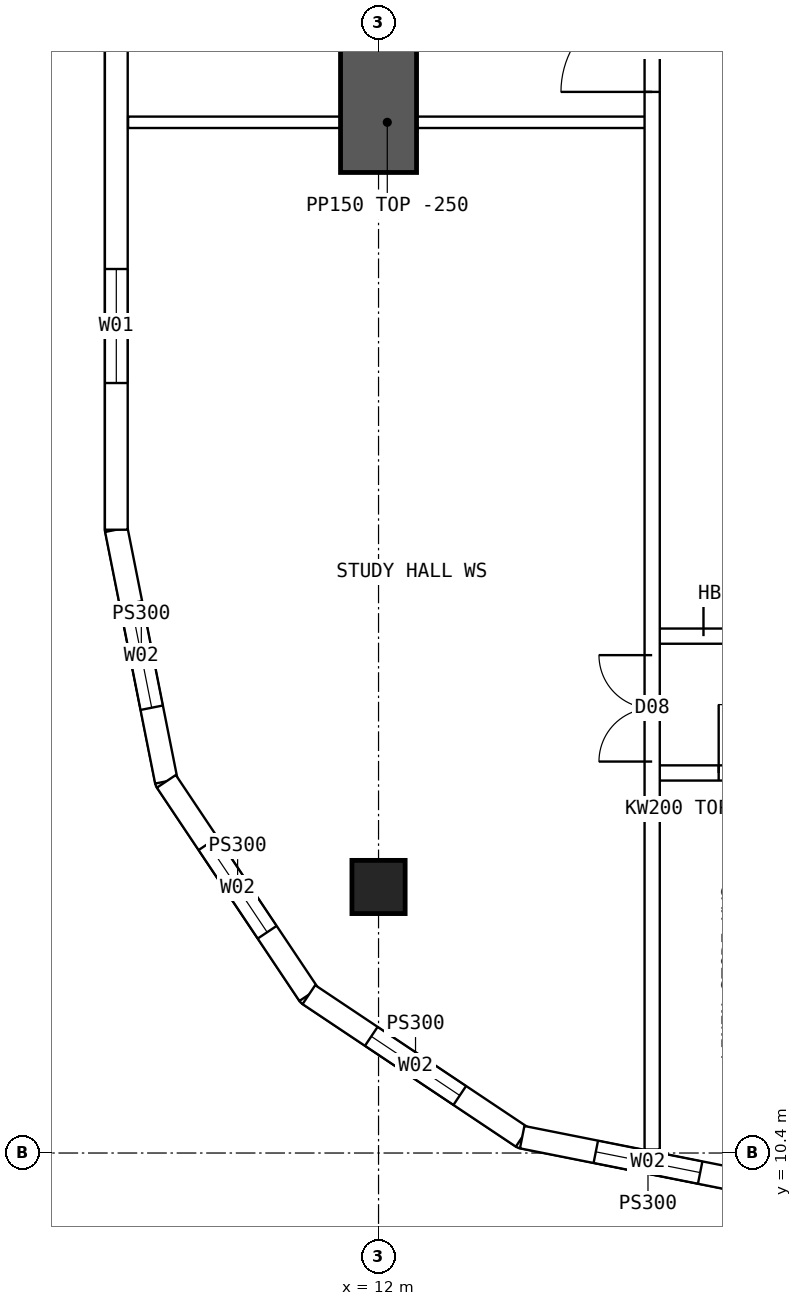
"""IFC4 building model, lengths in metres.
Left out: names, types, materials, properties, quantities, classifications, styles, units other than length and angle.
Written with IfcOpenShell. Run it as: python <this file> out.ifc"""

import sys

from ifc_helpers import new_model, si_unit, direction, frame, frame_2d, origin, origin_2d, place, context, subcontext, project, spatial, polyline, rectangle, hollow_rectangle, outline, extrude, element, fill, save


model = new_model("IFC4")
c1 = context("Model", 3, precision=1e-05, world=origin(), true_north=direction((0.0, 1.0)))
c2 = subcontext(c1, "Body", "Model", "MODEL_VIEW")
j1 = project(units=[si_unit("LENGTHUNIT", "METRE"), si_unit("PLANEANGLEUNIT", "RADIAN")], contexts=[c1])
p1 = place(None, origin())
s1 = spatial("IfcSite", under=j1, at=p1, CompositionType="ELEMENT")
p2 = place(p1, origin())
s2 = spatial("IfcBuilding", under=s1, at=p2, CompositionType="ELEMENT")
p3 = place(p2, frame((0.0, 0.0, 156.1)))
s3 = spatial("IfcBuildingStorey", under=s2, at=p3, CompositionType="ELEMENT", Elevation=156.1)
p4 = place(p3, frame((12.0, 13.9, 0.0), z_axis=(0.0, 0.0, 1.0), x_axis=(1.0, 0.0, 0.0)))
e1 = element("IfcColumn", 1, at=p4, inside=s3, PredefinedType="COLUMN", context=c2, shape_type="SweptSolid", body=[
    extrude(hollow_rectangle(XDim=0.7, YDim=0.7, WallThickness=0.07, at=origin_2d()), origin(), (0.0, 0.0, 1.0), 3.75),
])
p5 = place(p3, frame((12.0, 23.3, 0.0), z_axis=(0.0, 0.0, 1.0), x_axis=(0.0, 1.0, 0.0)))
e2 = element("IfcWall", 2, at=p5, inside=s3, PredefinedType="SHEAR", context=c2, shape_type="SweptSolid", body=[
    extrude(rectangle(XDim=5.0, YDim=1.0, at=frame_2d((2.5, 0.0))), origin(), (0.0, 0.0, 1.0), 3.75),
])
p6 = place(p3, frame((8.55, 45.4, 0.0), z_axis=(0.0, 0.0, 1.0), x_axis=(0.0, -1.0, 0.0)))
e3 = element("IfcWall", 3, at=p6, inside=s3, PredefinedType="SOLIDWALL", context=c2, shape_type="SweptSolid", body=[
    extrude(outline(polyline([(-0.015, -0.15), (26.815, -0.15), (26.785, 0.15), (0.015, 0.15), (-0.015, -0.15)])), origin(), (0.0, 0.0, 1.0), 3.5),
])
p7 = place(p6, frame((1.93, 0.0, 0.9)))
e4 = element("IfcOpeningElement", 4, at=p7, cuts=e3, PredefinedType="OPENING", context=c2, shape_type="SweptSolid", body=[
    extrude(rectangle(XDim=1.5, YDim=2.0, at=frame_2d((0.75, 1.0))), frame((0.0, 0.16, 0.0), z_axis=(0.0, -1.0, 0.0), x_axis=(1.0, 0.0, 0.0)), (0.0, 0.0, 1.0), 0.32),
])
p8 = place(p6, frame((7.29, 0.0, 0.9)))
e5 = element("IfcOpeningElement", 5, at=p8, cuts=e3, PredefinedType="OPENING", context=c2, shape_type="SweptSolid", body=[
    extrude(rectangle(XDim=1.5, YDim=2.0, at=frame_2d((0.75, 1.0))), frame((0.0, 0.16, 0.0), z_axis=(0.0, -1.0, 0.0), x_axis=(1.0, 0.0, 0.0)), (0.0, 0.0, 1.0), 0.32),
])
p9 = place(p6, frame((12.65, 0.0, 0.9)))
e6 = element("IfcOpeningElement", 6, at=p9, cuts=e3, PredefinedType="OPENING", context=c2, shape_type="SweptSolid", body=[
    extrude(rectangle(XDim=1.5, YDim=2.0, at=frame_2d((0.75, 1.0))), frame((0.0, 0.16, 0.0), z_axis=(0.0, -1.0, 0.0), x_axis=(1.0, 0.0, 0.0)), (0.0, 0.0, 1.0), 0.32),
])
p10 = place(p6, frame((18.01, 0.0, 0.9)))
e7 = element("IfcOpeningElement", 7, at=p10, cuts=e3, PredefinedType="OPENING", context=c2, shape_type="SweptSolid", body=[
    extrude(rectangle(XDim=1.5, YDim=2.0, at=frame_2d((0.75, 1.0))), frame((0.0, 0.16, 0.0), z_axis=(0.0, -1.0, 0.0), x_axis=(1.0, 0.0, 0.0)), (0.0, 0.0, 1.0), 0.32),
])
p11 = place(p6, frame((23.37, 0.0, 0.9)))
e8 = element("IfcOpeningElement", 8, at=p11, cuts=e3, PredefinedType="OPENING", context=c2, shape_type="SweptSolid", body=[
    extrude(rectangle(XDim=1.5, YDim=2.0, at=frame_2d((0.75, 1.0))), frame((0.0, 0.16, 0.0), z_axis=(0.0, -1.0, 0.0), x_axis=(1.0, 0.0, 0.0)), (0.0, 0.0, 1.0), 0.32),
])
p12 = place(p3, frame((8.55, 18.6, 0.0), z_axis=(0.0, 0.0, 1.0), x_axis=(0.19508664885, -0.980786011034, 0.0)))
e9 = element("IfcWall", 9, at=p12, inside=s3, PredefinedType="SOLIDWALL", context=c2, shape_type="SweptSolid", body=[
    extrude(outline(polyline([(-0.015, -0.15), (3.405, -0.15), (3.345, 0.15), (0.015, 0.15), (-0.015, -0.15)])), origin(), (0.0, 0.0, 1.0), 3.5),
])
p13 = place(p12, frame((0.988, 0.0, 0.9)))
e10 = element("IfcOpeningElement", 10, at=p13, cuts=e9, PredefinedType="OPENING", context=c2, shape_type="SweptSolid", body=[
    extrude(rectangle(XDim=1.4, YDim=1.8, at=frame_2d((0.7, 0.9))), frame((0.0, 0.16, 0.0), z_axis=(0.0, -1.0, 0.0), x_axis=(1.0, 0.0, 0.0)), (0.0, 0.0, 1.0), 0.32),
])
p14 = place(p3, frame((9.208, 15.29, 0.0), z_axis=(0.0, 0.0, 1.0), x_axis=(0.555534554399, -0.831493450887, 0.0)))
e11 = element("IfcWall", 11, at=p14, inside=s3, PredefinedType="SOLIDWALL", context=c2, shape_type="SweptSolid", body=[
    extrude(outline(polyline([(-0.03, -0.15), (3.405, -0.15), (3.345, 0.15), (0.03, 0.15), (-0.03, -0.15)])), origin(), (0.0, 0.0, 1.0), 3.5),
])
p15 = place(p14, frame((0.988, 0.0, 0.9)))
e12 = element("IfcOpeningElement", 12, at=p15, cuts=e11, PredefinedType="OPENING", context=c2, shape_type="SweptSolid", body=[
    extrude(rectangle(XDim=1.4, YDim=1.8, at=frame_2d((0.7, 0.9))), frame((0.0, 0.16, 0.0), z_axis=(0.0, -1.0, 0.0), x_axis=(1.0, 0.0, 0.0)), (0.0, 0.0, 1.0), 0.32),
])
p16 = place(p3, frame((11.083, 12.483, 0.0), z_axis=(0.0, 0.0, 1.0), x_axis=(0.831493450887, -0.555534554399, 0.0)))
e13 = element("IfcWall", 13, at=p16, inside=s3, PredefinedType="SOLIDWALL", context=c2, shape_type="SweptSolid", body=[
    extrude(outline(polyline([(-0.03, -0.15), (3.405, -0.15), (3.345, 0.15), (0.03, 0.15), (-0.03, -0.15)])), origin(), (0.0, 0.0, 1.0), 3.5),
])
p17 = place(p16, frame((0.988, 0.0, 0.9)))
e14 = element("IfcOpeningElement", 14, at=p17, cuts=e13, PredefinedType="OPENING", context=c2, shape_type="SweptSolid", body=[
    extrude(rectangle(XDim=1.4, YDim=1.8, at=frame_2d((0.7, 0.9))), frame((0.0, 0.16, 0.0), z_axis=(0.0, -1.0, 0.0), x_axis=(1.0, 0.0, 0.0)), (0.0, 0.0, 1.0), 0.32),
])
p18 = place(p3, frame((13.89, 10.608, 0.0), z_axis=(0.0, 0.0, 1.0), x_axis=(0.98078325777, -0.195100490205, 0.0)))
e15 = element("IfcWall", 15, at=p18, inside=s3, PredefinedType="SOLIDWALL", context=c2, shape_type="SweptSolid", body=[
    extrude(outline(polyline([(-0.03, -0.15), (3.405, -0.15), (3.345, 0.15), (0.03, 0.15), (-0.03, -0.15)])), origin(), (0.0, 0.0, 1.0), 3.5),
])
p19 = place(p18, frame((0.988, 0.0, 0.9)))
e16 = element("IfcOpeningElement", 16, at=p19, cuts=e15, PredefinedType="OPENING", context=c2, shape_type="SweptSolid", body=[
    extrude(rectangle(XDim=1.4, YDim=1.8, at=frame_2d((0.7, 0.9))), frame((0.0, 0.16, 0.0), z_axis=(0.0, -1.0, 0.0), x_axis=(1.0, 0.0, 0.0)), (0.0, 0.0, 1.0), 0.32),
])
p20 = place(p3, frame((15.6, 15.4, 0.0), z_axis=(0.0, 0.0, 1.0), x_axis=(1.0, 0.0, 0.0)))
e17 = element("IfcWall", 17, at=p20, inside=s3, PredefinedType="SOLIDWALL", context=c2, shape_type="SweptSolid", body=[
    extrude(rectangle(XDim=1.975, YDim=0.2, at=frame_2d((0.987, 0.0))), origin(), (0.0, 0.0, 1.0), 3.5),
])
p21 = place(p20, frame((0.875, 0.0, 0.0)))
e18 = element("IfcOpeningElement", 18, at=p21, cuts=e17, PredefinedType="OPENING", context=c2, shape_type="SweptSolid", body=[
    extrude(rectangle(XDim=0.9, YDim=2.1, at=frame_2d((0.45, 1.05))), frame((0.0, 0.11, 0.0), z_axis=(0.0, -1.0, 0.0), x_axis=(1.0, 0.0, 0.0)), (0.0, 0.0, 1.0), 0.22),
])
p22 = place(p3, frame((15.6, 17.2, 0.0), z_axis=(0.0, 0.0, 1.0), x_axis=(1.0, 0.0, 0.0)))
e19 = element("IfcWall", 19, at=p22, inside=s3, PredefinedType="SOLIDWALL", context=c2, shape_type="SweptSolid", body=[
    extrude(rectangle(XDim=1.975, YDim=0.2, at=frame_2d((0.987, 0.0))), origin(), (0.0, 0.0, 1.0), 3.5),
])
p23 = place(p22, frame((0.675, 0.0, 0.0)))
e20 = element("IfcOpeningElement", 20, at=p23, cuts=e19, PredefinedType="OPENING", context=c2, shape_type="SweptSolid", body=[
    extrude(rectangle(XDim=1.2, YDim=2.1, at=frame_2d((0.6, 1.05))), frame((0.0, 0.11, 0.0), z_axis=(0.0, -1.0, 0.0), x_axis=(1.0, 0.0, 0.0)), (0.0, 0.0, 1.0), 0.22),
])
p24 = place(p3, frame((15.6, 10.446, 0.0), z_axis=(0.0, 0.0, 1.0), x_axis=(0.0, 1.0, 0.0)))
e21 = element("IfcWall", 21, at=p24, inside=s3, PredefinedType="SOLIDWALL", context=c2, shape_type="SweptSolid", body=[
    extrude(rectangle(XDim=43.107, YDim=0.2, at=frame_2d((21.554, 0.0))), origin(), (0.0, 0.0, 1.0), 3.5),
])
p25 = place(p24, frame((13.914, 0.0, 0.0)))
e22 = element("IfcOpeningElement", 22, at=p25, cuts=e21, PredefinedType="OPENING", context=c2, shape_type="SweptSolid", body=[
    extrude(rectangle(XDim=1.2, YDim=2.1, at=frame_2d((0.6, 1.05))), frame((0.0, 0.11, 0.0), z_axis=(0.0, -1.0, 0.0), x_axis=(1.0, 0.0, 0.0)), (0.0, 0.0, 1.0), 0.22),
])
p26 = place(p24, frame((27.994, 0.0, 0.0)))
e23 = element("IfcOpeningElement", 23, at=p26, cuts=e21, PredefinedType="OPENING", context=c2, shape_type="SweptSolid", body=[
    extrude(rectangle(XDim=1.2, YDim=2.1, at=frame_2d((0.6, 1.05))), frame((0.0, 0.11, 0.0), z_axis=(0.0, -1.0, 0.0), x_axis=(1.0, 0.0, 0.0)), (0.0, 0.0, 1.0), 0.22),
])
p27 = place(p24, frame((5.104, 0.0, 0.0)))
e24 = element("IfcOpeningElement", 24, at=p27, cuts=e21, PredefinedType="OPENING", context=c2, shape_type="SweptSolid", body=[
    extrude(rectangle(XDim=1.4, YDim=2.1, at=frame_2d((0.7, 1.05))), frame((0.0, 0.11, 0.0), z_axis=(0.0, -1.0, 0.0), x_axis=(1.0, 0.0, 0.0)), (0.0, 0.0, 1.0), 0.22),
])
p28 = place(p24, frame((36.504, 0.0, 0.0)))
e25 = element("IfcOpeningElement", 25, at=p28, cuts=e21, PredefinedType="OPENING", context=c2, shape_type="SweptSolid", body=[
    extrude(rectangle(XDim=1.4, YDim=2.1, at=frame_2d((0.7, 1.05))), frame((0.0, 0.11, 0.0), z_axis=(0.0, -1.0, 0.0), x_axis=(1.0, 0.0, 0.0)), (0.0, 0.0, 1.0), 0.22),
])
p29 = place(p3, frame((8.705, 23.96, 0.0), z_axis=(0.0, 0.0, 1.0), x_axis=(1.0, 0.0, 0.0)))
e26 = element("IfcWall", 26, at=p29, inside=s3, PredefinedType="PARTITIONING", context=c2, shape_type="SweptSolid", body=[
    extrude(rectangle(XDim=6.82, YDim=0.15, at=frame_2d((3.41, 0.0))), origin(), (0.0, 0.0, 1.0), 3.5),
])
p30 = place(p11, origin())
e27 = element("IfcWindow", 27, at=p30, inside=s3, PartitioningType="SINGLE_PANEL", PredefinedType="WINDOW", context=c2, shape_type="SweptSolid", body=[
    extrude(rectangle(XDim=1.5, YDim=2.0, at=frame_2d((0.75, 1.0))), frame((0.0, 0.03, 0.0), z_axis=(0.0, -1.0, 0.0), x_axis=(1.0, 0.0, 0.0)), (0.0, 0.0, 1.0), 0.06),
])
fill(e8, e27)
p31 = place(p13, origin())
e28 = element("IfcWindow", 28, at=p31, inside=s3, PartitioningType="SINGLE_PANEL", PredefinedType="WINDOW", context=c2, shape_type="SweptSolid", body=[
    extrude(rectangle(XDim=1.4, YDim=1.8, at=frame_2d((0.7, 0.9))), frame((0.0, 0.03, 0.0), z_axis=(0.0, -1.0, 0.0), x_axis=(1.0, 0.0, 0.0)), (0.0, 0.0, 1.0), 0.06),
])
fill(e10, e28)
p32 = place(p15, origin())
e29 = element("IfcWindow", 29, at=p32, inside=s3, PartitioningType="SINGLE_PANEL", PredefinedType="WINDOW", context=c2, shape_type="SweptSolid", body=[
    extrude(rectangle(XDim=1.4, YDim=1.8, at=frame_2d((0.7, 0.9))), frame((0.0, 0.03, 0.0), z_axis=(0.0, -1.0, 0.0), x_axis=(1.0, 0.0, 0.0)), (0.0, 0.0, 1.0), 0.06),
])
fill(e12, e29)
p33 = place(p17, origin())
e30 = element("IfcWindow", 30, at=p33, inside=s3, PartitioningType="SINGLE_PANEL", PredefinedType="WINDOW", context=c2, shape_type="SweptSolid", body=[
    extrude(rectangle(XDim=1.4, YDim=1.8, at=frame_2d((0.7, 0.9))), frame((0.0, 0.03, 0.0), z_axis=(0.0, -1.0, 0.0), x_axis=(1.0, 0.0, 0.0)), (0.0, 0.0, 1.0), 0.06),
])
fill(e14, e30)
p34 = place(p19, origin())
e31 = element("IfcWindow", 31, at=p34, inside=s3, PartitioningType="SINGLE_PANEL", PredefinedType="WINDOW", context=c2, shape_type="SweptSolid", body=[
    extrude(rectangle(XDim=1.4, YDim=1.8, at=frame_2d((0.7, 0.9))), frame((0.0, 0.03, 0.0), z_axis=(0.0, -1.0, 0.0), x_axis=(1.0, 0.0, 0.0)), (0.0, 0.0, 1.0), 0.06),
])
fill(e16, e31)
p35 = place(p23, origin())
e32 = element("IfcDoor", 32, at=p35, inside=s3, OperationType="DOUBLE_DOOR_SINGLE_SWING", PredefinedType="DOOR", context=c2, shape_type="SweptSolid", body=[
    extrude(rectangle(XDim=1.2, YDim=2.1, at=frame_2d((0.6, 1.05))), frame((0.0, 0.025, 0.0), z_axis=(0.0, -1.0, 0.0), x_axis=(1.0, 0.0, 0.0)), (0.0, 0.0, 1.0), 0.05),
])
fill(e20, e32)
p36 = place(p25, origin())
e33 = element("IfcDoor", 33, at=p36, inside=s3, OperationType="SINGLE_SWING_LEFT", PredefinedType="DOOR", context=c2, shape_type="SweptSolid", body=[
    extrude(rectangle(XDim=1.2, YDim=2.1, at=frame_2d((0.6, 1.05))), frame((0.0, 0.025, 0.0), z_axis=(0.0, -1.0, 0.0), x_axis=(1.0, 0.0, 0.0)), (0.0, 0.0, 1.0), 0.05),
])
fill(e22, e33)
p37 = place(p27, origin())
e34 = element("IfcDoor", 34, at=p37, inside=s3, OperationType="DOUBLE_DOOR_SINGLE_SWING", PredefinedType="DOOR", context=c2, shape_type="SweptSolid", body=[
    extrude(rectangle(XDim=1.4, YDim=2.1, at=frame_2d((0.7, 1.05))), frame((0.0, 0.025, 0.0), z_axis=(0.0, -1.0, 0.0), x_axis=(1.0, 0.0, 0.0)), (0.0, 0.0, 1.0), 0.05),
])
fill(e24, e34)
p38 = place(p21, origin())
e35 = element("IfcDoor", 35, at=p38, inside=s3, OperationType="SINGLE_SWING_LEFT", PredefinedType="DOOR", context=c2, shape_type="SweptSolid", body=[
    extrude(rectangle(XDim=0.9, YDim=2.1, at=frame_2d((0.45, 1.05))), frame((0.0, 0.025, 0.0), z_axis=(0.0, -1.0, 0.0), x_axis=(1.0, 0.0, 0.0)), (0.0, 0.0, 1.0), 0.05),
])
fill(e18, e35)
save(model, sys.argv[1])
